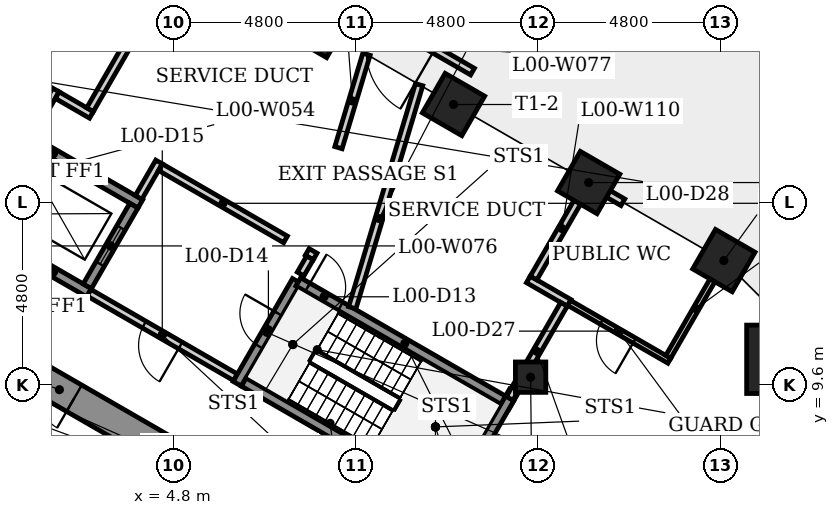
"""IFC4 building model, lengths in metres.
Left out: names, types, materials, properties, quantities, classifications, styles, units other than length and angle.
Written with IfcOpenShell. Run it as: python <this file> out.ifc"""

import sys

from ifc_helpers import new_model, si_unit, direction, frame, frame_2d, origin, origin_2d, place, context, subcontext, project, spatial, rectangle, extrude, element, fill, save


model = new_model("IFC4")
c1 = context("Model", 3, precision=1e-05, world=origin(), true_north=direction((0.0, 1.0)))
c2 = subcontext(c1, "Body", "Model", "MODEL_VIEW")
j1 = project(units=[si_unit("LENGTHUNIT", "METRE"), si_unit("PLANEANGLEUNIT", "RADIAN")], contexts=[c1])
p1 = place(None, origin())
s1 = spatial("IfcSite", under=j1, at=p1, CompositionType="ELEMENT")
p2 = place(p1, origin())
s2 = spatial("IfcBuilding", under=s1, at=p2, CompositionType="ELEMENT")
p3 = place(p2, origin())
s3 = spatial("IfcBuildingStorey", under=s2, at=p3, CompositionType="ELEMENT", Elevation=0.0)
p4 = place(p3, frame((9.3, 5.138, -0.5), z_axis=(0.0, 0.0, 1.0), x_axis=(-0.866023993627, 0.500002442456, 0.0)))
e1 = element("IfcWall", 1, at=p4, inside=s3, PredefinedType="SHEAR", context=c2, shape_type="SweptSolid", body=[
    extrude(rectangle(XDim=10.97, YDim=0.8, at=frame_2d((5.485, 0.0))), origin(), (0.0, 0.0, 1.0), 7.5),
])
p5 = place(p4, frame((8.21, 0.0, 0.5)))
e2 = element("IfcOpeningElement", 2, at=p5, cuts=e1, PredefinedType="OPENING", context=c2, shape_type="SweptSolid", body=[
    extrude(rectangle(XDim=0.9, YDim=2.1, at=frame_2d((0.45, 1.05))), frame((0.0, 0.41, 0.0), z_axis=(0.0, -1.0, 0.0), x_axis=(1.0, 0.0, 0.0)), (0.0, 0.0, 1.0), 0.82),
])
p6 = place(p4, frame((2.126, 0.0, 0.5)))
e3 = element("IfcOpeningElement", 3, at=p6, cuts=e1, PredefinedType="OPENING", context=c2, shape_type="SweptSolid", body=[
    extrude(rectangle(XDim=0.9, YDim=2.1, at=frame_2d((0.45, 1.05))), frame((0.0, 0.41, 0.0), z_axis=(0.0, -1.0, 0.0), x_axis=(1.0, 0.0, 0.0)), (0.0, 0.0, 1.0), 0.82),
])
p7 = place(p3, frame((20.785, 10.268, -0.5), z_axis=(0.0, 0.0, 1.0), x_axis=(1.0, 0.0, 0.0)))
e4 = element("IfcColumn", 4, at=p7, inside=s3, PredefinedType="COLUMN", context=c2, shape_type="SweptSolid", body=[
    extrude(rectangle(XDim=1.8, YDim=1.8, at=origin_2d()), origin(), (0.0, 0.0, 1.0), 7.5),
])
for number, where, z_axis, x_axis in (
    (5, (19.285, 12.866, -0.5), (0.0, 0.0, 1.0), (0.5, 0.866, 0.0)),
    (6, (15.728, 14.92, -0.5), (0.0, 0.0, 1.0), (0.5, 0.866, 0.0)),
    (7, (12.171, 16.973, -0.5), (0.0, 0.0, 1.0), (0.5, 0.866, 0.0)),
    (8, (8.614, 19.027, -0.5), (0.0, 0.0, 1.0), (0.5, 0.866, 0.0)),
):
    element("IfcColumn", number, at=place(p3, frame(where, z_axis=z_axis, x_axis=x_axis)), inside=s3, PredefinedType="COLUMN", context=c2, shape_type="SweptSolid", body=[
        extrude(rectangle(XDim=1.2, YDim=1.2, at=origin_2d()), origin(), (0.0, 0.0, 1.0), 7.5),
    ])
p8 = place(p3, frame((14.2, 9.798, -0.5), z_axis=(0.0, 0.0, 1.0), x_axis=(1.0, 0.0, 0.0)))
e9 = element("IfcColumn", 9, at=p8, inside=s3, PredefinedType="COLUMN", context=c2, shape_type="SweptSolid", body=[
    extrude(rectangle(XDim=0.8, YDim=0.8, at=origin_2d()), origin(), (0.0, 0.0, 1.0), 7.5),
])
p9 = place(p3, frame((12.671, 17.839, 0.0), z_axis=(0.0, 0.0, 1.0), x_axis=(-0.865995510393, 0.500051773299, 0.0)))
e10 = element("IfcWall", 10, at=p9, inside=s3, PredefinedType="SOLIDWALL", context=c2, shape_type="SweptSolid", body=[
    extrude(rectangle(XDim=4.107, YDim=0.2, at=frame_2d((2.053, 0.0))), origin(), (0.0, 0.0, 1.0), 7.0),
])
p10 = place(p9, frame((1.154, 0.0, 0.0)))
e11 = element("IfcOpeningElement", 11, at=p10, cuts=e10, PredefinedType="OPENING", context=c2, shape_type="SweptSolid", body=[
    extrude(rectangle(XDim=1.8, YDim=2.6, at=frame_2d((0.9, 1.3))), frame((0.0, 0.11, 0.0), z_axis=(0.0, -1.0, 0.0), x_axis=(1.0, 0.0, 0.0)), (0.0, 0.0, 1.0), 0.22),
])
p11 = place(p9, frame((1.154, 0.0, 3.0)))
e12 = element("IfcOpeningElement", 12, at=p11, cuts=e10, PredefinedType="OPENING", context=c2, shape_type="SweptSolid", body=[
    extrude(rectangle(XDim=1.8, YDim=2.2, at=frame_2d((0.9, 1.1))), frame((0.0, 0.11, 0.0), z_axis=(0.0, -1.0, 0.0), x_axis=(1.0, 0.0, 0.0)), (0.0, 0.0, 1.0), 0.22),
])
p12 = place(p3, frame((1.027, 16.179, 0.0), z_axis=(0.0, 0.0, 1.0), x_axis=(0.499924531544, 0.866068971134, 0.0)))
e13 = element("IfcWall", 13, at=p12, inside=s3, PredefinedType="PLUMBINGWALL", context=c2, shape_type="SweptSolid", body=[
    extrude(rectangle(XDim=1.36, YDim=0.2, at=frame_2d((0.68, 0.0))), origin(), (0.0, 0.0, 1.0), 6.6),
])
p13 = place(p3, frame((1.073, 16.008, 0.0), z_axis=(0.0, 0.0, 1.0), x_axis=(0.866040211805, -0.499974350878, 0.0)))
e14 = element("IfcWall", 14, at=p13, inside=s3, PredefinedType="SHEAR", context=c2, shape_type="SweptSolid", body=[
    extrude(rectangle(XDim=3.3, YDim=0.25, at=frame_2d((1.65, 0.0))), origin(), (0.0, 0.0, 1.0), 6.6),
])
p14 = place(p3, frame((1.743, 17.22, 0.0), z_axis=(0.0, 0.0, 1.0), x_axis=(0.86599391852, -0.500054530113, 0.0)))
e15 = element("IfcWall", 15, at=p14, inside=s3, PredefinedType="PLUMBINGWALL", context=c2, shape_type="SweptSolid", body=[
    extrude(rectangle(XDim=1.04, YDim=0.2, at=frame_2d((0.52, 0.0))), origin(), (0.0, 0.0, 1.0), 6.6),
])
p15 = place(p3, frame((2.581, 12.02, 0.0), z_axis=(0.0, 0.0, 1.0), x_axis=(-0.86603892542, 0.499976579108, 0.0)))
e16 = element("IfcWall", 16, at=p15, inside=s3, PredefinedType="SHEAR", context=c2, shape_type="SweptSolid", body=[
    extrude(rectangle(XDim=2.162, YDim=0.25, at=frame_2d((1.081, 0.0))), origin(), (0.0, 0.0, 1.0), 6.6),
])
p16 = place(p3, frame((2.535, 12.191, 0.0), z_axis=(0.0, 0.0, 1.0), x_axis=(0.500061746146, 0.865989751695, 0.0)))
e17 = element("IfcWall", 17, at=p16, inside=s3, PredefinedType="SHEAR", context=c2, shape_type="SweptSolid", body=[
    extrude(rectangle(XDim=2.45, YDim=0.25, at=frame_2d((1.225, 0.0))), origin(), (0.0, 0.0, 1.0), 7.0),
])
p17 = place(p16, frame((0.675, 0.0, 0.0)))
e18 = element("IfcOpeningElement", 18, at=p17, cuts=e17, PredefinedType="OPENING", context=c2, shape_type="SweptSolid", body=[
    extrude(rectangle(XDim=1.1, YDim=2.1, at=frame_2d((0.55, 1.05))), frame((0.0, 0.135, 0.0), z_axis=(0.0, -1.0, 0.0), x_axis=(1.0, 0.0, 0.0)), (0.0, 0.0, 1.0), 0.27),
])
p18 = place(p3, frame((2.607, 16.837, 0.0), z_axis=(0.0, 0.0, 1.0), x_axis=(0.500002801628, 0.866023786258, 0.0)))
e19 = element("IfcWall", 19, at=p18, inside=s3, PredefinedType="PLUMBINGWALL", context=c2, shape_type="SweptSolid", body=[
    extrude(rectangle(XDim=4.9, YDim=0.2, at=frame_2d((2.45, 0.0))), origin(), (0.0, 0.0, 1.0), 6.6),
])
p19 = place(p3, frame((3.885, 14.529, 0.0), z_axis=(0.0, 0.0, 1.0), x_axis=(0.499997628298, 0.866026773083, 0.0)))
e20 = element("IfcWall", 20, at=p19, inside=s3, PredefinedType="PLUMBINGWALL", context=c2, shape_type="SweptSolid", body=[
    extrude(rectangle(XDim=1.075, YDim=0.2, at=frame_2d((0.538, 0.0))), origin(), (0.0, 0.0, 1.0), 6.6),
])
p20 = place(p3, frame((4.459, 15.323, 0.0), z_axis=(0.0, 0.0, 1.0), x_axis=(0.86601654697, -0.500015340139, 0.0)))
e21 = element("IfcWall", 21, at=p20, inside=s3, PredefinedType="PLUMBINGWALL", context=c2, shape_type="SweptSolid", body=[
    extrude(rectangle(XDim=3.8, YDim=0.2, at=frame_2d((1.9, 0.0))), origin(), (0.0, 0.0, 1.0), 6.6),
])
p21 = place(p3, frame((6.435, 9.795, 0.0), z_axis=(0.0, 0.0, 1.0), x_axis=(-0.866012907634, 0.500021643343, 0.0)))
e22 = element("IfcWall", 22, at=p21, inside=s3, PredefinedType="PARTITIONING", context=c2, shape_type="SweptSolid", body=[
    extrude(rectangle(XDim=4.45, YDim=0.2, at=frame_2d((2.225, 0.0))), origin(), (0.0, 0.0, 1.0), 6.6),
])
p22 = place(p21, frame((1.675, 0.0, 0.0)))
e23 = element("IfcOpeningElement", 23, at=p22, cuts=e22, PredefinedType="OPENING", context=c2, shape_type="SweptSolid", body=[
    extrude(rectangle(XDim=1.1, YDim=2.1, at=frame_2d((0.55, 1.05))), frame((0.0, 0.11, 0.0), z_axis=(0.0, -1.0, 0.0), x_axis=(1.0, 0.0, 0.0)), (0.0, 0.0, 1.0), 0.22),
])
p23 = place(p3, frame((6.48, 9.624, 0.0), z_axis=(0.0, 0.0, 1.0), x_axis=(0.500004234368, 0.866022959057, 0.0)))
e24 = element("IfcWall", 24, at=p23, inside=s3, PredefinedType="SHEAR", context=c2, shape_type="SweptSolid", body=[
    extrude(rectangle(XDim=3.125, YDim=0.25, at=frame_2d((1.562, 0.0))), origin(), (0.0, 0.0, 1.0), 6.6),
])
p24 = place(p23, frame((1.14, 0.0, 0.0)))
e25 = element("IfcOpeningElement", 25, at=p24, cuts=e24, PredefinedType="OPENING", context=c2, shape_type="SweptSolid", body=[
    extrude(rectangle(XDim=1.0, YDim=2.1, at=frame_2d((0.5, 1.05))), frame((0.0, 0.135, 0.0), z_axis=(0.0, -1.0, 0.0), x_axis=(1.0, 0.0, 0.0)), (0.0, 0.0, 1.0), 0.27),
])
p25 = place(p3, frame((8.086, 12.306, 0.0), z_axis=(0.0, 0.0, 1.0), x_axis=(0.866027988781, -0.499995522627, 0.0)))
e26 = element("IfcWall", 26, at=p25, inside=s3, PredefinedType="SHEAR", context=c2, shape_type="SweptSolid", body=[
    extrude(rectangle(XDim=6.475, YDim=0.25, at=frame_2d((3.238, 0.0))), origin(), (0.0, 0.0, 1.0), 6.6),
])
p26 = place(p25, frame((0.285, 0.0, 0.0)))
e27 = element("IfcOpeningElement", 27, at=p26, cuts=e26, PredefinedType="OPENING", context=c2, shape_type="SweptSolid", body=[
    extrude(rectangle(XDim=1.0, YDim=2.1, at=frame_2d((0.5, 1.05))), frame((0.0, 0.135, 0.0), z_axis=(0.0, -1.0, 0.0), x_axis=(1.0, 0.0, 0.0)), (0.0, 0.0, 1.0), 0.27),
])
p27 = place(p3, frame((8.322, 13.093, 0.0), z_axis=(0.0, 0.0, 1.0), x_axis=(0.865658885915, -0.500634290912, 0.0)))
e28 = element("IfcWall", 28, at=p27, inside=s3, PredefinedType="PARTITIONING", context=c2, shape_type="SweptSolid", body=[
    extrude(rectangle(XDim=0.24, YDim=0.2, at=frame_2d((0.12, 0.0))), origin(), (0.0, 0.0, 1.0), 6.6),
])
p28 = place(p3, frame((8.393, 12.937, 0.0), z_axis=(0.0, 0.0, 1.0), x_axis=(-0.499895202697, -0.866085900082, 0.0)))
e29 = element("IfcWall", 29, at=p28, inside=s3, PredefinedType="PARTITIONING", context=c2, shape_type="SweptSolid", body=[
    extrude(rectangle(XDim=0.489, YDim=0.2, at=frame_2d((0.245, 0.0))), origin(), (0.0, 0.0, 1.0), 6.6),
])
p29 = place(p3, frame((9.508, 11.625, 0.0), z_axis=(0.0, 0.0, 1.0), x_axis=(0.286880018175, 0.957966520904, 0.0)))
e30 = element("IfcWall", 30, at=p29, inside=s3, PredefinedType="PLUMBINGWALL", context=c2, shape_type="SweptSolid", body=[
    extrude(rectangle(XDim=6.128, YDim=0.2, at=frame_2d((3.064, 0.0))), origin(), (0.0, 0.0, 1.0), 6.6),
])
p30 = place(p3, frame((9.88, 18.296, 0.0), z_axis=(0.0, 0.0, 1.0), x_axis=(-0.286850320116, -0.957975414011, 0.0)))
e31 = element("IfcWall", 31, at=p30, inside=s3, PredefinedType="PLUMBINGWALL", context=c2, shape_type="SweptSolid", body=[
    extrude(rectangle(XDim=2.566, YDim=0.2, at=frame_2d((1.283, 0.0))), origin(), (0.0, 0.0, 1.0), 6.6),
])
p31 = place(p3, frame((12.194, 6.47, 0.0), z_axis=(0.0, 0.0, 1.0), x_axis=(-0.866025499775, 0.499999833739, 0.0)))
e32 = element("IfcWall", 32, at=p31, inside=s3, PredefinedType="SHEAR", context=c2, shape_type="SweptSolid", body=[
    extrude(rectangle(XDim=6.4, YDim=0.25, at=frame_2d((3.2, 0.0))), origin(), (0.0, 0.0, 1.0), 6.6),
])
p32 = place(p3, frame((13.755, 9.424, 0.0), z_axis=(0.0, 0.0, 1.0), x_axis=(-0.500011789842, -0.866018596809, 0.0)))
e33 = element("IfcWall", 33, at=p32, inside=s3, PredefinedType="SHEAR", context=c2, shape_type="SweptSolid", body=[
    extrude(rectangle(XDim=3.214, YDim=0.25, at=frame_2d((1.607, 0.0))), origin(), (0.0, 0.0, 1.0), 6.6),
])
p33 = place(p3, frame((14.141, 12.372, 0.0), z_axis=(0.0, 0.0, 1.0), x_axis=(0.866028115054, -0.499995303914, 0.0)))
e34 = element("IfcWall", 34, at=p33, inside=s3, PredefinedType="PLUMBINGWALL", context=c2, shape_type="SweptSolid", body=[
    extrude(rectangle(XDim=1.239, YDim=0.2, at=frame_2d((0.62, 0.0))), origin(), (0.0, 0.0, 1.0), 6.6),
])
p34 = place(p3, frame((15.078, 11.715, 0.0), z_axis=(0.0, 0.0, 1.0), x_axis=(-0.499958946799, -0.866049104564, 0.0)))
e35 = element("IfcWall", 35, at=p34, inside=s3, PredefinedType="PLUMBINGWALL", context=c2, shape_type="SweptSolid", body=[
    extrude(rectangle(XDim=2.86, YDim=0.2, at=frame_2d((1.43, 0.0))), origin(), (0.0, 0.0, 1.0), 6.6),
])
p35 = place(p3, frame((15.778, 15.006, 0.0), z_axis=(0.0, 0.0, 1.0), x_axis=(-0.50002537861, -0.866010750942, 0.0)))
e36 = element("IfcWall", 36, at=p35, inside=s3, PredefinedType="PLUMBINGWALL", context=c2, shape_type="SweptSolid", body=[
    extrude(rectangle(XDim=3.0, YDim=0.2, at=frame_2d((1.5, 0.0))), origin(), (0.0, 0.0, 1.0), 6.6),
])
p36 = place(p3, frame((16.628, 14.4, 0.0), z_axis=(0.0, 0.0, 1.0), x_axis=(-0.865995139556, 0.500052415518, 0.0)))
e37 = element("IfcWall", 37, at=p36, inside=s3, PredefinedType="PLUMBINGWALL", context=c2, shape_type="SweptSolid", body=[
    extrude(rectangle(XDim=0.939, YDim=0.2, at=frame_2d((0.47, 0.0))), origin(), (0.0, 0.0, 1.0), 5.675),
])
p37 = place(p3, frame((17.85, 10.23, 0.0), z_axis=(0.0, 0.0, 1.0), x_axis=(-0.866042639228, 0.499970146148, 0.0)))
e38 = element("IfcWall", 38, at=p37, inside=s3, PredefinedType="PARTITIONING", context=c2, shape_type="SweptSolid", body=[
    extrude(rectangle(XDim=3.043, YDim=0.15, at=frame_2d((1.521, 0.0))), origin(), (0.0, 0.0, 1.0), 6.6),
])
p38 = place(p37, frame((1.059, 0.0, 0.0)))
e39 = element("IfcOpeningElement", 39, at=p38, cuts=e38, PredefinedType="OPENING", context=c2, shape_type="SweptSolid", body=[
    extrude(rectangle(XDim=1.0, YDim=2.1, at=frame_2d((0.5, 1.05))), frame((0.0, 0.085, 0.0), z_axis=(0.0, -1.0, 0.0), x_axis=(1.0, 0.0, 0.0)), (0.0, 0.0, 1.0), 0.17),
])
p39 = place(p3, frame((19.285, 12.866, 0.0), z_axis=(0.0, 0.0, 1.0), x_axis=(-0.500062034277, -0.865989585315, 0.0)))
e40 = element("IfcWall", 40, at=p39, inside=s3, PredefinedType="PARTITIONING", context=c2, shape_type="SweptSolid", body=[
    extrude(rectangle(XDim=2.925, YDim=0.15, at=frame_2d((1.462, 0.0))), origin(), (0.0, 0.0, 1.0), 6.6),
])
p40 = place(p26, origin())
e41 = element("IfcDoor", 41, at=p40, inside=s3, OperationType="SINGLE_SWING_LEFT", PredefinedType="DOOR", context=c2, shape_type="SweptSolid", body=[
    extrude(rectangle(XDim=1.0, YDim=2.1, at=frame_2d((0.5, 1.05))), frame((0.0, 0.025, 0.0), z_axis=(0.0, -1.0, 0.0), x_axis=(1.0, 0.0, 0.0)), (0.0, 0.0, 1.0), 0.05),
])
fill(e27, e41)
p41 = place(p24, origin())
e42 = element("IfcDoor", 42, at=p41, inside=s3, OperationType="SINGLE_SWING_RIGHT", PredefinedType="DOOR", context=c2, shape_type="SweptSolid", body=[
    extrude(rectangle(XDim=1.0, YDim=2.1, at=frame_2d((0.5, 1.05))), frame((0.0, 0.025, 0.0), z_axis=(0.0, -1.0, 0.0), x_axis=(1.0, 0.0, 0.0)), (0.0, 0.0, 1.0), 0.05),
])
fill(e25, e42)
p42 = place(p22, origin())
e43 = element("IfcDoor", 43, at=p42, inside=s3, OperationType="SINGLE_SWING_LEFT", PredefinedType="DOOR", context=c2, shape_type="SweptSolid", body=[
    extrude(rectangle(XDim=1.1, YDim=2.1, at=frame_2d((0.55, 1.05))), frame((0.0, 0.025, 0.0), z_axis=(0.0, -1.0, 0.0), x_axis=(1.0, 0.0, 0.0)), (0.0, 0.0, 1.0), 0.05),
])
fill(e23, e43)
p43 = place(p17, origin())
e44 = element("IfcDoor", 44, at=p43, inside=s3, OperationType="SLIDING_TO_LEFT", PredefinedType="DOOR", context=c2, shape_type="SweptSolid", body=[
    extrude(rectangle(XDim=1.1, YDim=2.1, at=frame_2d((0.55, 1.05))), frame((0.0, 0.025, 0.0), z_axis=(0.0, -1.0, 0.0), x_axis=(1.0, 0.0, 0.0)), (0.0, 0.0, 1.0), 0.05),
])
fill(e18, e44)
p44 = place(p38, origin())
e45 = element("IfcDoor", 45, at=p44, inside=s3, OperationType="SINGLE_SWING_LEFT", PredefinedType="DOOR", context=c2, shape_type="SweptSolid", body=[
    extrude(rectangle(XDim=1.0, YDim=2.1, at=frame_2d((0.5, 1.05))), frame((0.0, 0.025, 0.0), z_axis=(0.0, -1.0, 0.0), x_axis=(1.0, 0.0, 0.0)), (0.0, 0.0, 1.0), 0.05),
])
fill(e39, e45)
p45 = place(p5, origin())
e46 = element("IfcDoor", 46, at=p45, inside=s3, OperationType="SINGLE_SWING_LEFT", PredefinedType="DOOR", context=c2, shape_type="SweptSolid", body=[
    extrude(rectangle(XDim=0.9, YDim=2.1, at=frame_2d((0.45, 1.05))), frame((0.0, 0.025, 0.0), z_axis=(0.0, -1.0, 0.0), x_axis=(1.0, 0.0, 0.0)), (0.0, 0.0, 1.0), 0.05),
])
fill(e2, e46)
save(model, sys.argv[1])
